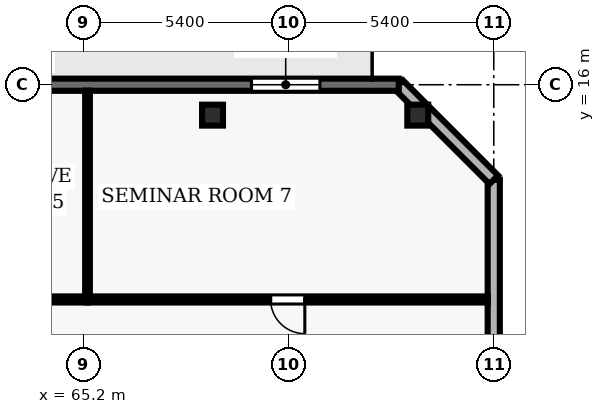
"""IFC4 building model, lengths in metres.
Left out: names, types, materials, properties, quantities, classifications, styles, units other than length and angle.
Written with IfcOpenShell. Run it as: python <this file> out.ifc"""

import sys

from ifc_helpers import new_model, si_unit, direction, frame, frame_2d, origin, origin_2d, place, context, subcontext, project, spatial, rectangle, hollow_rectangle, extrude, element, fill, save


model = new_model("IFC4")
c1 = context("Model", 3, precision=1e-05, world=origin(), true_north=direction((0.0, 1.0)))
c2 = subcontext(c1, "Body", "Model", "MODEL_VIEW")
j1 = project(units=[si_unit("LENGTHUNIT", "METRE"), si_unit("PLANEANGLEUNIT", "RADIAN")], contexts=[c1])
p1 = place(None, origin())
s1 = spatial("IfcSite", under=j1, at=p1, CompositionType="ELEMENT")
p2 = place(p1, origin())
s2 = spatial("IfcBuilding", under=s1, at=p2, CompositionType="ELEMENT")
p3 = place(p2, frame((0.0, 0.0, 73.9)))
s3 = spatial("IfcBuildingStorey", under=s2, at=p3, CompositionType="ELEMENT", Elevation=73.9)
for number, where, z_axis, x_axis in (
    (1, (68.6, 15.2, 0.0), (0.0, 0.0, 1.0), (1.0, 0.0, 0.0)),
    (2, (74.0, 15.2, 0.0), (0.0, 0.0, 1.0), (1.0, 0.0, 0.0)),
):
    element("IfcColumn", number, at=place(p3, frame(where, z_axis=z_axis, x_axis=x_axis)), inside=s3, PredefinedType="COLUMN", context=c2, shape_type="SweptSolid", body=[
        extrude(hollow_rectangle(XDim=0.55, YDim=0.55, WallThickness=0.025, at=origin_2d()), origin(), (0.0, 0.0, 1.0), 3.9),
    ])
p4 = place(p3, frame((76.0, 2.5, 0.0), z_axis=(0.0, 0.0, 1.0), x_axis=(0.0, 1.0, 0.0)))
e3 = element("IfcWall", 3, at=p4, inside=s3, PredefinedType="SOLIDWALL", context=c2, shape_type="SweptSolid", body=[
    extrude(rectangle(XDim=11.0, YDim=0.32, at=frame_2d((5.5, 0.0))), origin(), (0.0, 0.0, 1.0), 3.69),
])
p5 = place(p4, frame((1.55, 0.0, 0.9)))
e4 = element("IfcOpeningElement", 4, at=p5, cuts=e3, PredefinedType="OPENING", context=c2, shape_type="SweptSolid", body=[
    extrude(rectangle(XDim=2.4, YDim=1.8, at=frame_2d((1.2, 0.9))), frame((0.0, 0.17, 0.0), z_axis=(0.0, -1.0, 0.0), x_axis=(1.0, 0.0, 0.0)), (0.0, 0.0, 1.0), 0.34),
])
p6 = place(p3, frame((76.0, 13.5, 0.0), z_axis=(0.0, 0.0, 1.0), x_axis=(-0.707106781187, 0.707106781187, 0.0)))
e5 = element("IfcWall", 5, at=p6, inside=s3, PredefinedType="SOLIDWALL", context=c2, shape_type="SweptSolid", body=[
    extrude(rectangle(XDim=3.536, YDim=0.32, at=frame_2d((1.768, 0.0))), origin(), (0.0, 0.0, 1.0), 3.69),
])
p7 = place(p3, frame((73.5, 16.0, 0.0), z_axis=(0.0, 0.0, 1.0), x_axis=(-1.0, 0.0, 0.0)))
e6 = element("IfcWall", 6, at=p7, inside=s3, PredefinedType="SOLIDWALL", context=c2, shape_type="SweptSolid", body=[
    extrude(rectangle(XDim=23.8, YDim=0.32, at=frame_2d((11.9, 0.0))), origin(), (0.0, 0.0, 1.0), 3.69),
])
p8 = place(p7, frame((12.4, 0.0, 0.0)))
e7 = element("IfcOpeningElement", 7, at=p8, cuts=e6, PredefinedType="OPENING", context=c2, shape_type="SweptSolid", body=[
    extrude(rectangle(XDim=1.0, YDim=2.2, at=frame_2d((0.5, 1.1))), frame((0.0, 0.17, 0.0), z_axis=(0.0, -1.0, 0.0), x_axis=(1.0, 0.0, 0.0)), (0.0, 0.0, 1.0), 0.34),
])
p9 = place(p7, frame((2.075, 0.0, 0.9)))
e8 = element("IfcOpeningElement", 8, at=p9, cuts=e6, PredefinedType="OPENING", context=c2, shape_type="SweptSolid", body=[
    extrude(rectangle(XDim=1.8, YDim=2.2, at=frame_2d((0.9, 1.1))), frame((0.0, 0.17, 0.0), z_axis=(0.0, -1.0, 0.0), x_axis=(1.0, 0.0, 0.0)), (0.0, 0.0, 1.0), 0.34),
])
p10 = place(p3, frame((65.31, 10.35, 0.0), z_axis=(0.0, 0.0, 1.0), x_axis=(-1.0, 0.0, 0.0)))
e9 = element("IfcWall", 9, at=p10, inside=s3, PredefinedType="PARTITIONING", context=c2, shape_type="SweptSolid", body=[
    extrude(rectangle(XDim=12.13, YDim=0.16, at=frame_2d((6.065, 0.0))), origin(), (0.0, 0.0, 1.0), 3.277),
])
p11 = place(p10, frame((5.615, 0.0, 0.0)))
e10 = element("IfcOpeningElement", 10, at=p11, cuts=e9, PredefinedType="OPENING", context=c2, shape_type="SweptSolid", body=[
    extrude(rectangle(XDim=0.9, YDim=2.1, at=frame_2d((0.45, 1.05))), frame((0.0, 0.09, 0.0), z_axis=(0.0, -1.0, 0.0), x_axis=(1.0, 0.0, 0.0)), (0.0, 0.0, 1.0), 0.18),
])
p12 = place(p3, frame((75.845, 10.35, 0.0), z_axis=(0.0, 0.0, 1.0), x_axis=(-1.0, 0.0, 0.0)))
e11 = element("IfcWall", 11, at=p12, inside=s3, PredefinedType="PARTITIONING", context=c2, shape_type="SweptSolid", body=[
    extrude(rectangle(XDim=10.535, YDim=0.16, at=frame_2d((5.268, 0.0))), origin(), (0.0, 0.0, 1.0), 3.277),
])
p13 = place(p12, frame((4.817, 0.0, 0.0)))
e12 = element("IfcOpeningElement", 12, at=p13, cuts=e11, PredefinedType="OPENING", context=c2, shape_type="SweptSolid", body=[
    extrude(rectangle(XDim=0.9, YDim=2.1, at=frame_2d((0.45, 1.05))), frame((0.0, 0.09, 0.0), z_axis=(0.0, -1.0, 0.0), x_axis=(1.0, 0.0, 0.0)), (0.0, 0.0, 1.0), 0.18),
])
p14 = place(p3, frame((65.31, 10.425, 0.0), z_axis=(0.0, 0.0, 1.0), x_axis=(0.0, 1.0, 0.0)))
e13 = element("IfcWall", 13, at=p14, inside=s3, PredefinedType="PARTITIONING", context=c2, shape_type="SweptSolid", body=[
    extrude(rectangle(XDim=5.42, YDim=0.125, at=frame_2d((2.71, 0.0))), origin(), (0.0, 0.0, 1.0), 3.69),
])
p15 = place(p9, origin())
e14 = element("IfcWindow", 14, at=p15, inside=s3, PartitioningType="SINGLE_PANEL", PredefinedType="WINDOW", context=c2, shape_type="SweptSolid", body=[
    extrude(rectangle(XDim=1.8, YDim=2.2, at=frame_2d((0.9, 1.1))), frame((0.0, 0.03, 0.0), z_axis=(0.0, -1.0, 0.0), x_axis=(1.0, 0.0, 0.0)), (0.0, 0.0, 1.0), 0.06),
])
fill(e8, e14)
p16 = place(p13, origin())
e15 = element("IfcDoor", 15, at=p16, inside=s3, OperationType="SINGLE_SWING_LEFT", PredefinedType="DOOR", context=c2, shape_type="SweptSolid", body=[
    extrude(rectangle(XDim=0.9, YDim=2.1, at=frame_2d((0.45, 1.05))), frame((0.0, 0.025, 0.0), z_axis=(0.0, -1.0, 0.0), x_axis=(1.0, 0.0, 0.0)), (0.0, 0.0, 1.0), 0.05),
])
fill(e12, e15)
save(model, sys.argv[1])
